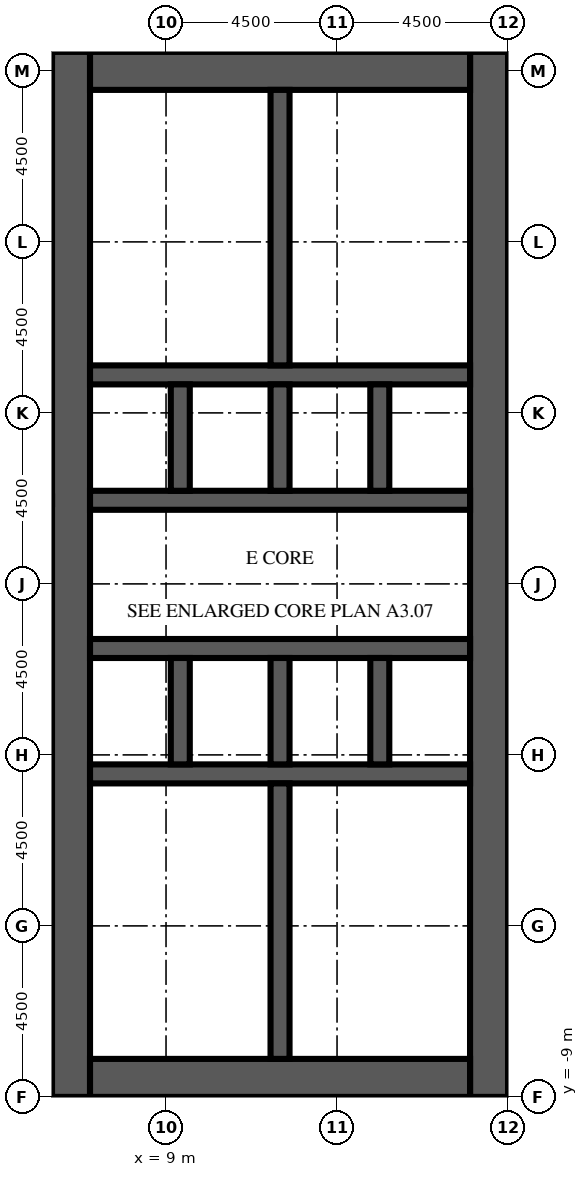
"""IFC4 building model, lengths in metres.
Left out: names, types, materials, properties, quantities, classifications, styles, units other than length and angle.
Written with IfcOpenShell. Run it as: python <this file> out.ifc"""

import sys

from ifc_helpers import new_model, si_unit, direction, frame, frame_2d, origin, place, context, subcontext, project, spatial, rectangle, extrude, element, fill, save


model = new_model("IFC4")
c1 = context("Model", 3, precision=1e-05, world=origin(), true_north=direction((0.0, 1.0)))
c2 = subcontext(c1, "Body", "Model", "MODEL_VIEW")
j1 = project(units=[si_unit("LENGTHUNIT", "METRE"), si_unit("PLANEANGLEUNIT", "RADIAN")], contexts=[c1])
p1 = place(None, origin())
s1 = spatial("IfcSite", under=j1, at=p1, CompositionType="ELEMENT")
p2 = place(p1, origin())
s2 = spatial("IfcBuilding", under=s1, at=p2, CompositionType="ELEMENT")
p3 = place(p2, frame((0.0, 0.0, 35.9)))
s3 = spatial("IfcBuildingStorey", under=s2, at=p3, CompositionType="ELEMENT", Elevation=35.9)
p4 = place(p3, frame((6.5, -9.0, 0.0), z_axis=(0.0, 0.0, 1.0), x_axis=(0.0, 1.0, 0.0)))
e1 = element("IfcWall", 1, at=p4, inside=s3, PredefinedType="SHEAR", context=c2, shape_type="SweptSolid", body=[
    extrude(rectangle(XDim=27.5, YDim=1.0, at=frame_2d((13.75, 0.0))), origin(), (0.0, 0.0, 1.0), 6.0),
])
p5 = place(p4, frame((12.55, 0.0, 0.0)))
e2 = element("IfcOpeningElement", 2, at=p5, cuts=e1, PredefinedType="OPENING", context=c2, shape_type="SweptSolid", body=[
    extrude(rectangle(XDim=2.4, YDim=2.4, at=frame_2d((1.2, 1.2))), frame((0.0, 0.51, 0.0), z_axis=(0.0, -1.0, 0.0), x_axis=(1.0, 0.0, 0.0)), (0.0, 0.0, 1.0), 1.02),
])
p6 = place(p4, frame((4.025, 0.0, 0.0)))
e3 = element("IfcOpeningElement", 3, at=p6, cuts=e1, PredefinedType="OPENING", context=c2, shape_type="SweptSolid", body=[
    extrude(rectangle(XDim=1.2, YDim=2.1, at=frame_2d((0.6, 1.05))), frame((0.0, 0.51, 0.0), z_axis=(0.0, -1.0, 0.0), x_axis=(1.0, 0.0, 0.0)), (0.0, 0.0, 1.0), 1.02),
])
p7 = place(p4, frame((19.475, 0.0, 0.0)))
e4 = element("IfcOpeningElement", 4, at=p7, cuts=e1, PredefinedType="OPENING", context=c2, shape_type="SweptSolid", body=[
    extrude(rectangle(XDim=1.0, YDim=2.1, at=frame_2d((0.5, 1.05))), frame((0.0, 0.51, 0.0), z_axis=(0.0, -1.0, 0.0), x_axis=(1.0, 0.0, 0.0)), (0.0, 0.0, 1.0), 1.02),
])
p8 = place(p4, frame((21.106, 0.0, 0.0)))
e5 = element("IfcOpeningElement", 5, at=p8, cuts=e1, PredefinedType="OPENING", context=c2, shape_type="SweptSolid", body=[
    extrude(rectangle(XDim=1.0, YDim=2.1, at=frame_2d((0.5, 1.05))), frame((0.0, 0.51, 0.0), z_axis=(0.0, -1.0, 0.0), x_axis=(1.0, 0.0, 0.0)), (0.0, 0.0, 1.0), 1.02),
])
p9 = place(p4, frame((23.1, 0.0, 0.0)))
e6 = element("IfcOpeningElement", 6, at=p9, cuts=e1, PredefinedType="OPENING", context=c2, shape_type="SweptSolid", body=[
    extrude(rectangle(XDim=1.0, YDim=2.1, at=frame_2d((0.5, 1.05))), frame((0.0, 0.51, 0.0), z_axis=(0.0, -1.0, 0.0), x_axis=(1.0, 0.0, 0.0)), (0.0, 0.0, 1.0), 1.02),
])
p10 = place(p4, frame((25.094, 0.0, 0.0)))
e7 = element("IfcOpeningElement", 7, at=p10, cuts=e1, PredefinedType="OPENING", context=c2, shape_type="SweptSolid", body=[
    extrude(rectangle(XDim=1.0, YDim=2.1, at=frame_2d((0.5, 1.05))), frame((0.0, 0.51, 0.0), z_axis=(0.0, -1.0, 0.0), x_axis=(1.0, 0.0, 0.0)), (0.0, 0.0, 1.0), 1.02),
])
p11 = place(p3, frame((17.5, -9.0, 0.0), z_axis=(0.0, 0.0, 1.0), x_axis=(0.0, 1.0, 0.0)))
e8 = element("IfcWall", 8, at=p11, inside=s3, PredefinedType="SHEAR", context=c2, shape_type="SweptSolid", body=[
    extrude(rectangle(XDim=27.5, YDim=1.0, at=frame_2d((13.75, 0.0))), origin(), (0.0, 0.0, 1.0), 6.0),
])
p12 = place(p11, frame((12.55, 0.0, 0.0)))
e9 = element("IfcOpeningElement", 9, at=p12, cuts=e8, PredefinedType="OPENING", context=c2, shape_type="SweptSolid", body=[
    extrude(rectangle(XDim=2.4, YDim=2.4, at=frame_2d((1.2, 1.2))), frame((0.0, 0.51, 0.0), z_axis=(0.0, -1.0, 0.0), x_axis=(1.0, 0.0, 0.0)), (0.0, 0.0, 1.0), 1.02),
])
p13 = place(p11, frame((6.825, 0.0, 0.0)))
e10 = element("IfcOpeningElement", 10, at=p13, cuts=e8, PredefinedType="OPENING", context=c2, shape_type="SweptSolid", body=[
    extrude(rectangle(XDim=1.2, YDim=2.1, at=frame_2d((0.6, 1.05))), frame((0.0, 0.51, 0.0), z_axis=(0.0, -1.0, 0.0), x_axis=(1.0, 0.0, 0.0)), (0.0, 0.0, 1.0), 1.02),
])
p14 = place(p11, frame((19.475, 0.0, 0.0)))
e11 = element("IfcOpeningElement", 11, at=p14, cuts=e8, PredefinedType="OPENING", context=c2, shape_type="SweptSolid", body=[
    extrude(rectangle(XDim=1.2, YDim=2.1, at=frame_2d((0.6, 1.05))), frame((0.0, 0.51, 0.0), z_axis=(0.0, -1.0, 0.0), x_axis=(1.0, 0.0, 0.0)), (0.0, 0.0, 1.0), 1.02),
])
for number, where, z_axis, x_axis in (
    (12, (7.0, -8.5, 0.0), (0.0, 0.0, 1.0), (1.0, 0.0, 0.0)),
    (13, (7.0, 18.0, 0.0), (0.0, 0.0, 1.0), (1.0, 0.0, 0.0)),
):
    element("IfcWall", number, at=place(p3, frame(where, z_axis=z_axis, x_axis=x_axis)), inside=s3, PredefinedType="SHEAR", context=c2, shape_type="SweptSolid", body=[
        extrude(rectangle(XDim=10.0, YDim=1.0, at=frame_2d((5.0, 0.0))), origin(), (0.0, 0.0, 1.0), 6.0),
    ])
p15 = place(p3, frame((7.0, -0.5, 0.0), z_axis=(0.0, 0.0, 1.0), x_axis=(1.0, 0.0, 0.0)))
e14 = element("IfcWall", 14, at=p15, inside=s3, PredefinedType="SHEAR", context=c2, shape_type="SweptSolid", body=[
    extrude(rectangle(XDim=10.0, YDim=0.5, at=frame_2d((5.0, 0.0))), origin(), (0.0, 0.0, 1.0), 6.0),
])
p16 = place(p3, frame((7.0, 2.8, 0.0), z_axis=(0.0, 0.0, 1.0), x_axis=(1.0, 0.0, 0.0)))
e15 = element("IfcWall", 15, at=p16, inside=s3, PredefinedType="SHEAR", context=c2, shape_type="SweptSolid", body=[
    extrude(rectangle(XDim=10.0, YDim=0.5, at=frame_2d((5.0, 0.0))), origin(), (0.0, 0.0, 1.0), 6.0),
])
p17 = place(p16, frame((0.512, 0.0, 0.0)))
e16 = element("IfcOpeningElement", 16, at=p17, cuts=e15, PredefinedType="OPENING", context=c2, shape_type="SweptSolid", body=[
    extrude(rectangle(XDim=1.1, YDim=2.1, at=frame_2d((0.55, 1.05))), frame((0.0, 0.26, 0.0), z_axis=(0.0, -1.0, 0.0), x_axis=(1.0, 0.0, 0.0)), (0.0, 0.0, 1.0), 0.52),
])
p18 = place(p16, frame((3.137, 0.0, 0.0)))
e17 = element("IfcOpeningElement", 17, at=p18, cuts=e15, PredefinedType="OPENING", context=c2, shape_type="SweptSolid", body=[
    extrude(rectangle(XDim=1.1, YDim=2.1, at=frame_2d((0.55, 1.05))), frame((0.0, 0.26, 0.0), z_axis=(0.0, -1.0, 0.0), x_axis=(1.0, 0.0, 0.0)), (0.0, 0.0, 1.0), 0.52),
])
p19 = place(p16, frame((8.387, 0.0, 0.0)))
e18 = element("IfcOpeningElement", 18, at=p19, cuts=e15, PredefinedType="OPENING", context=c2, shape_type="SweptSolid", body=[
    extrude(rectangle(XDim=1.1, YDim=2.1, at=frame_2d((0.55, 1.05))), frame((0.0, 0.26, 0.0), z_axis=(0.0, -1.0, 0.0), x_axis=(1.0, 0.0, 0.0)), (0.0, 0.0, 1.0), 0.52),
])
p20 = place(p3, frame((7.0, 6.7, 0.0), z_axis=(0.0, 0.0, 1.0), x_axis=(1.0, 0.0, 0.0)))
e19 = element("IfcWall", 19, at=p20, inside=s3, PredefinedType="SHEAR", context=c2, shape_type="SweptSolid", body=[
    extrude(rectangle(XDim=10.0, YDim=0.5, at=frame_2d((5.0, 0.0))), origin(), (0.0, 0.0, 1.0), 6.0),
])
p21 = place(p20, frame((0.512, 0.0, 0.0)))
e20 = element("IfcOpeningElement", 20, at=p21, cuts=e19, PredefinedType="OPENING", context=c2, shape_type="SweptSolid", body=[
    extrude(rectangle(XDim=1.1, YDim=2.1, at=frame_2d((0.55, 1.05))), frame((0.0, 0.26, 0.0), z_axis=(0.0, -1.0, 0.0), x_axis=(1.0, 0.0, 0.0)), (0.0, 0.0, 1.0), 0.52),
])
p22 = place(p20, frame((3.188, 0.0, 0.0)))
e21 = element("IfcOpeningElement", 21, at=p22, cuts=e19, PredefinedType="OPENING", context=c2, shape_type="SweptSolid", body=[
    extrude(rectangle(XDim=1.0, YDim=2.1, at=frame_2d((0.5, 1.05))), frame((0.0, 0.26, 0.0), z_axis=(0.0, -1.0, 0.0), x_axis=(1.0, 0.0, 0.0)), (0.0, 0.0, 1.0), 0.52),
])
p23 = place(p20, frame((5.812, 0.0, 0.0)))
e22 = element("IfcOpeningElement", 22, at=p23, cuts=e19, PredefinedType="OPENING", context=c2, shape_type="SweptSolid", body=[
    extrude(rectangle(XDim=1.0, YDim=2.1, at=frame_2d((0.5, 1.05))), frame((0.0, 0.26, 0.0), z_axis=(0.0, -1.0, 0.0), x_axis=(1.0, 0.0, 0.0)), (0.0, 0.0, 1.0), 0.52),
])
p24 = place(p20, frame((8.438, 0.0, 0.0)))
e23 = element("IfcOpeningElement", 23, at=p24, cuts=e19, PredefinedType="OPENING", context=c2, shape_type="SweptSolid", body=[
    extrude(rectangle(XDim=1.0, YDim=2.1, at=frame_2d((0.5, 1.05))), frame((0.0, 0.26, 0.0), z_axis=(0.0, -1.0, 0.0), x_axis=(1.0, 0.0, 0.0)), (0.0, 0.0, 1.0), 0.52),
])
p25 = place(p3, frame((7.0, 10.0, 0.0), z_axis=(0.0, 0.0, 1.0), x_axis=(1.0, 0.0, 0.0)))
e24 = element("IfcWall", 24, at=p25, inside=s3, PredefinedType="SHEAR", context=c2, shape_type="SweptSolid", body=[
    extrude(rectangle(XDim=10.0, YDim=0.5, at=frame_2d((5.0, 0.0))), origin(), (0.0, 0.0, 1.0), 6.0),
])
for number, where, z_axis, x_axis in (
    (25, (9.375, -0.25, 0.0), (0.0, 0.0, 1.0), (0.0, 1.0, 0.0)),
    (26, (9.375, 6.95, 0.0), (0.0, 0.0, 1.0), (0.0, 1.0, 0.0)),
    (27, (12.0, -0.25, 0.0), (0.0, 0.0, 1.0), (0.0, 1.0, 0.0)),
    (28, (12.0, 6.95, 0.0), (0.0, 0.0, 1.0), (0.0, 1.0, 0.0)),
    (29, (14.625, -0.25, 0.0), (0.0, 0.0, 1.0), (0.0, 1.0, 0.0)),
    (30, (14.625, 6.95, 0.0), (0.0, 0.0, 1.0), (0.0, 1.0, 0.0)),
):
    element("IfcWall", number, at=place(p3, frame(where, z_axis=z_axis, x_axis=x_axis)), inside=s3, PredefinedType="SHEAR", context=c2, shape_type="SweptSolid", body=[
        extrude(rectangle(XDim=2.8, YDim=0.5, at=frame_2d((1.4, 0.0))), origin(), (0.0, 0.0, 1.0), 6.0),
    ])
for number, where, z_axis, x_axis in (
    (31, (12.0, -8.0, 0.0), (0.0, 0.0, 1.0), (0.0, 1.0, 0.0)),
    (32, (12.0, 10.25, 0.0), (0.0, 0.0, 1.0), (0.0, 1.0, 0.0)),
):
    element("IfcWall", number, at=place(p3, frame(where, z_axis=z_axis, x_axis=x_axis)), inside=s3, PredefinedType="SHEAR", context=c2, shape_type="SweptSolid", body=[
        extrude(rectangle(XDim=7.25, YDim=0.5, at=frame_2d((3.625, 0.0))), origin(), (0.0, 0.0, 1.0), 6.0),
    ])
p26 = place(p3, frame((7.0, -5.825, 0.0), z_axis=(0.0, 0.0, 1.0), x_axis=(1.0, 0.0, 0.0)))
e33 = element("IfcWall", 33, at=p26, inside=s3, PredefinedType="PARTITIONING", context=c2, shape_type="SweptSolid", body=[
    extrude(rectangle(XDim=1.6, YDim=0.1, at=frame_2d((0.8, 0.0))), origin(), (0.0, 0.0, 1.0), 5.55),
])
p27 = place(p26, frame((0.3, 0.0, 0.0)))
e34 = element("IfcOpeningElement", 34, at=p27, cuts=e33, PredefinedType="OPENING", context=c2, shape_type="SweptSolid", body=[
    extrude(rectangle(XDim=1.0, YDim=2.1, at=frame_2d((0.5, 1.05))), frame((0.0, 0.06, 0.0), z_axis=(0.0, -1.0, 0.0), x_axis=(1.0, 0.0, 0.0)), (0.0, 0.0, 1.0), 0.12),
])
p28 = place(p3, frame((7.0, -2.925, 0.0), z_axis=(0.0, 0.0, 1.0), x_axis=(1.0, 0.0, 0.0)))
e35 = element("IfcWall", 35, at=p28, inside=s3, PredefinedType="PARTITIONING", context=c2, shape_type="SweptSolid", body=[
    extrude(rectangle(XDim=1.6, YDim=0.1, at=frame_2d((0.8, 0.0))), origin(), (0.0, 0.0, 1.0), 5.55),
])
p29 = place(p28, frame((0.3, 0.0, 0.0)))
e36 = element("IfcOpeningElement", 36, at=p29, cuts=e35, PredefinedType="OPENING", context=c2, shape_type="SweptSolid", body=[
    extrude(rectangle(XDim=1.0, YDim=2.1, at=frame_2d((0.5, 1.05))), frame((0.0, 0.06, 0.0), z_axis=(0.0, -1.0, 0.0), x_axis=(1.0, 0.0, 0.0)), (0.0, 0.0, 1.0), 0.12),
])
p30 = place(p3, frame((8.6, -5.825, 0.0), z_axis=(0.0, 0.0, 1.0), x_axis=(0.0, 1.0, 0.0)))
e37 = element("IfcWall", 37, at=p30, inside=s3, PredefinedType="PARTITIONING", context=c2, shape_type="SweptSolid", body=[
    extrude(rectangle(XDim=2.9, YDim=0.1, at=frame_2d((1.45, 0.0))), origin(), (0.0, 0.0, 1.0), 5.55),
])
p31 = place(p30, frame((0.95, 0.0, 0.0)))
e38 = element("IfcOpeningElement", 38, at=p31, cuts=e37, PredefinedType="OPENING", context=c2, shape_type="SweptSolid", body=[
    extrude(rectangle(XDim=1.0, YDim=2.1, at=frame_2d((0.5, 1.05))), frame((0.0, 0.06, 0.0), z_axis=(0.0, -1.0, 0.0), x_axis=(1.0, 0.0, 0.0)), (0.0, 0.0, 1.0), 0.12),
])
for number, where, z_axis, x_axis in (
    (39, (8.6, -5.825, 0.0), (0.0, 0.0, 1.0), (1.0, 0.0, 0.0)),
    (40, (8.6, -2.925, 0.0), (0.0, 0.0, 1.0), (1.0, 0.0, 0.0)),
):
    element("IfcWall", number, at=place(p3, frame(where, z_axis=z_axis, x_axis=x_axis)), inside=s3, PredefinedType="PARTITIONING", context=c2, shape_type="SweptSolid", body=[
        extrude(rectangle(XDim=3.15, YDim=0.1, at=frame_2d((1.575, 0.0))), origin(), (0.0, 0.0, 1.0), 5.55),
    ])
for number, where, z_axis, x_axis in (
    (41, (7.0, 11.7, 0.0), (0.0, 0.0, 1.0), (1.0, 0.0, 0.0)),
    (42, (7.0, 13.512, 0.0), (0.0, 0.0, 1.0), (1.0, 0.0, 0.0)),
    (43, (7.0, 15.688, 0.0), (0.0, 0.0, 1.0), (1.0, 0.0, 0.0)),
):
    element("IfcWall", number, at=place(p3, frame(where, z_axis=z_axis, x_axis=x_axis)), inside=s3, PredefinedType="PARTITIONING", context=c2, shape_type="SweptSolid", body=[
        extrude(rectangle(XDim=4.75, YDim=0.1, at=frame_2d((2.375, 0.0))), origin(), (0.0, 0.0, 1.0), 5.55),
    ])
p32 = place(p17, origin())
e44 = element("IfcDoor", 44, at=p32, inside=s3, OperationType="DOUBLE_DOOR_SLIDING", PredefinedType="DOOR", context=c2, shape_type="SweptSolid", body=[
    extrude(rectangle(XDim=1.1, YDim=2.1, at=frame_2d((0.55, 1.05))), frame((0.0, 0.025, 0.0), z_axis=(0.0, -1.0, 0.0), x_axis=(1.0, 0.0, 0.0)), (0.0, 0.0, 1.0), 0.05),
])
fill(e16, e44)
p33 = place(p18, origin())
e45 = element("IfcDoor", 45, at=p33, inside=s3, OperationType="DOUBLE_DOOR_SLIDING", PredefinedType="DOOR", context=c2, shape_type="SweptSolid", body=[
    extrude(rectangle(XDim=1.1, YDim=2.1, at=frame_2d((0.55, 1.05))), frame((0.0, 0.025, 0.0), z_axis=(0.0, -1.0, 0.0), x_axis=(1.0, 0.0, 0.0)), (0.0, 0.0, 1.0), 0.05),
])
fill(e17, e45)
p34 = place(p19, origin())
e46 = element("IfcDoor", 46, at=p34, inside=s3, OperationType="DOUBLE_DOOR_SLIDING", PredefinedType="DOOR", context=c2, shape_type="SweptSolid", body=[
    extrude(rectangle(XDim=1.1, YDim=2.1, at=frame_2d((0.55, 1.05))), frame((0.0, 0.025, 0.0), z_axis=(0.0, -1.0, 0.0), x_axis=(1.0, 0.0, 0.0)), (0.0, 0.0, 1.0), 0.05),
])
fill(e18, e46)
p35 = place(p21, origin())
e47 = element("IfcDoor", 47, at=p35, inside=s3, OperationType="DOUBLE_DOOR_SLIDING", PredefinedType="DOOR", context=c2, shape_type="SweptSolid", body=[
    extrude(rectangle(XDim=1.1, YDim=2.1, at=frame_2d((0.55, 1.05))), frame((0.0, 0.025, 0.0), z_axis=(0.0, -1.0, 0.0), x_axis=(1.0, 0.0, 0.0)), (0.0, 0.0, 1.0), 0.05),
])
fill(e20, e47)
p36 = place(p5, origin())
e48 = element("IfcDoor", 48, at=p36, inside=s3, OperationType="DOUBLE_DOOR_DOUBLE_SWING", PredefinedType="DOOR", context=c2, shape_type="SweptSolid", body=[
    extrude(rectangle(XDim=2.4, YDim=2.4, at=frame_2d((1.2, 1.2))), frame((0.0, 0.025, 0.0), z_axis=(0.0, -1.0, 0.0), x_axis=(1.0, 0.0, 0.0)), (0.0, 0.0, 1.0), 0.05),
])
fill(e2, e48)
p37 = place(p12, origin())
e49 = element("IfcDoor", 49, at=p37, inside=s3, OperationType="DOUBLE_DOOR_DOUBLE_SWING", PredefinedType="DOOR", context=c2, shape_type="SweptSolid", body=[
    extrude(rectangle(XDim=2.4, YDim=2.4, at=frame_2d((1.2, 1.2))), frame((0.0, 0.025, 0.0), z_axis=(0.0, -1.0, 0.0), x_axis=(1.0, 0.0, 0.0)), (0.0, 0.0, 1.0), 0.05),
])
fill(e9, e49)
p38 = place(p13, frame((1.2, 0.0, 0.0), z_axis=(0.0, 0.0, 1.0), x_axis=(-1.0, 0.0, 0.0)))
e50 = element("IfcDoor", 50, at=p38, inside=s3, OperationType="SINGLE_SWING_LEFT", PredefinedType="DOOR", context=c2, shape_type="SweptSolid", body=[
    extrude(rectangle(XDim=1.2, YDim=2.1, at=frame_2d((0.6, 1.05))), frame((0.0, 0.025, 0.0), z_axis=(0.0, -1.0, 0.0), x_axis=(1.0, 0.0, 0.0)), (0.0, 0.0, 1.0), 0.05),
])
fill(e10, e50)
p39 = place(p14, frame((1.2, 0.0, 0.0), z_axis=(0.0, 0.0, 1.0), x_axis=(-1.0, 0.0, 0.0)))
e51 = element("IfcDoor", 51, at=p39, inside=s3, OperationType="SINGLE_SWING_LEFT", PredefinedType="DOOR", context=c2, shape_type="SweptSolid", body=[
    extrude(rectangle(XDim=1.2, YDim=2.1, at=frame_2d((0.6, 1.05))), frame((0.0, 0.025, 0.0), z_axis=(0.0, -1.0, 0.0), x_axis=(1.0, 0.0, 0.0)), (0.0, 0.0, 1.0), 0.05),
])
fill(e11, e51)
p40 = place(p22, origin())
e52 = element("IfcDoor", 52, at=p40, inside=s3, OperationType="SINGLE_SWING_RIGHT", PredefinedType="DOOR", context=c2, shape_type="SweptSolid", body=[
    extrude(rectangle(XDim=1.0, YDim=2.1, at=frame_2d((0.5, 1.05))), frame((0.0, 0.025, 0.0), z_axis=(0.0, -1.0, 0.0), x_axis=(1.0, 0.0, 0.0)), (0.0, 0.0, 1.0), 0.05),
])
fill(e21, e52)
p41 = place(p23, origin())
e53 = element("IfcDoor", 53, at=p41, inside=s3, OperationType="SINGLE_SWING_LEFT", PredefinedType="DOOR", context=c2, shape_type="SweptSolid", body=[
    extrude(rectangle(XDim=1.0, YDim=2.1, at=frame_2d((0.5, 1.05))), frame((0.0, 0.025, 0.0), z_axis=(0.0, -1.0, 0.0), x_axis=(1.0, 0.0, 0.0)), (0.0, 0.0, 1.0), 0.05),
])
fill(e22, e53)
p42 = place(p24, origin())
e54 = element("IfcDoor", 54, at=p42, inside=s3, OperationType="SINGLE_SWING_RIGHT", PredefinedType="DOOR", context=c2, shape_type="SweptSolid", body=[
    extrude(rectangle(XDim=1.0, YDim=2.1, at=frame_2d((0.5, 1.05))), frame((0.0, 0.025, 0.0), z_axis=(0.0, -1.0, 0.0), x_axis=(1.0, 0.0, 0.0)), (0.0, 0.0, 1.0), 0.05),
])
fill(e23, e54)
p43 = place(p6, origin())
e55 = element("IfcDoor", 55, at=p43, inside=s3, OperationType="SINGLE_SWING_RIGHT", PredefinedType="DOOR", context=c2, shape_type="SweptSolid", body=[
    extrude(rectangle(XDim=1.2, YDim=2.1, at=frame_2d((0.6, 1.05))), frame((0.0, -0.425, 0.0), z_axis=(0.0, -1.0, 0.0), x_axis=(1.0, 0.0, 0.0)), (0.0, 0.0, 1.0), 0.05),
])
fill(e3, e55)
p44 = place(p27, origin())
e56 = element("IfcDoor", 56, at=p44, inside=s3, OperationType="SINGLE_SWING_LEFT", PredefinedType="DOOR", context=c2, shape_type="SweptSolid", body=[
    extrude(rectangle(XDim=1.0, YDim=2.1, at=frame_2d((0.5, 1.05))), frame((0.0, 0.025, 0.0), z_axis=(0.0, -1.0, 0.0), x_axis=(1.0, 0.0, 0.0)), (0.0, 0.0, 1.0), 0.05),
])
fill(e34, e56)
p45 = place(p29, origin())
e57 = element("IfcDoor", 57, at=p45, inside=s3, OperationType="SINGLE_SWING_RIGHT", PredefinedType="DOOR", context=c2, shape_type="SweptSolid", body=[
    extrude(rectangle(XDim=1.0, YDim=2.1, at=frame_2d((0.5, 1.05))), frame((0.0, 0.025, 0.0), z_axis=(0.0, -1.0, 0.0), x_axis=(1.0, 0.0, 0.0)), (0.0, 0.0, 1.0), 0.05),
])
fill(e36, e57)
p46 = place(p31, origin())
e58 = element("IfcDoor", 58, at=p46, inside=s3, OperationType="SINGLE_SWING_LEFT", PredefinedType="DOOR", context=c2, shape_type="SweptSolid", body=[
    extrude(rectangle(XDim=1.0, YDim=2.1, at=frame_2d((0.5, 1.05))), frame((0.0, 0.025, 0.0), z_axis=(0.0, -1.0, 0.0), x_axis=(1.0, 0.0, 0.0)), (0.0, 0.0, 1.0), 0.05),
])
fill(e38, e58)
p47 = place(p7, origin())
e59 = element("IfcDoor", 59, at=p47, inside=s3, OperationType="SINGLE_SWING_RIGHT", PredefinedType="DOOR", context=c2, shape_type="SweptSolid", body=[
    extrude(rectangle(XDim=1.0, YDim=2.1, at=frame_2d((0.5, 1.05))), frame((0.0, -0.425, 0.0), z_axis=(0.0, -1.0, 0.0), x_axis=(1.0, 0.0, 0.0)), (0.0, 0.0, 1.0), 0.05),
])
fill(e4, e59)
p48 = place(p8, origin())
e60 = element("IfcDoor", 60, at=p48, inside=s3, OperationType="SINGLE_SWING_LEFT", PredefinedType="DOOR", context=c2, shape_type="SweptSolid", body=[
    extrude(rectangle(XDim=1.0, YDim=2.1, at=frame_2d((0.5, 1.05))), frame((0.0, -0.425, 0.0), z_axis=(0.0, -1.0, 0.0), x_axis=(1.0, 0.0, 0.0)), (0.0, 0.0, 1.0), 0.05),
])
fill(e5, e60)
p49 = place(p9, origin())
e61 = element("IfcDoor", 61, at=p49, inside=s3, OperationType="SINGLE_SWING_RIGHT", PredefinedType="DOOR", context=c2, shape_type="SweptSolid", body=[
    extrude(rectangle(XDim=1.0, YDim=2.1, at=frame_2d((0.5, 1.05))), frame((0.0, -0.425, 0.0), z_axis=(0.0, -1.0, 0.0), x_axis=(1.0, 0.0, 0.0)), (0.0, 0.0, 1.0), 0.05),
])
fill(e6, e61)
p50 = place(p10, origin())
e62 = element("IfcDoor", 62, at=p50, inside=s3, OperationType="SINGLE_SWING_LEFT", PredefinedType="DOOR", context=c2, shape_type="SweptSolid", body=[
    extrude(rectangle(XDim=1.0, YDim=2.1, at=frame_2d((0.5, 1.05))), frame((0.0, -0.425, 0.0), z_axis=(0.0, -1.0, 0.0), x_axis=(1.0, 0.0, 0.0)), (0.0, 0.0, 1.0), 0.05),
])
fill(e7, e62)
save(model, sys.argv[1])
